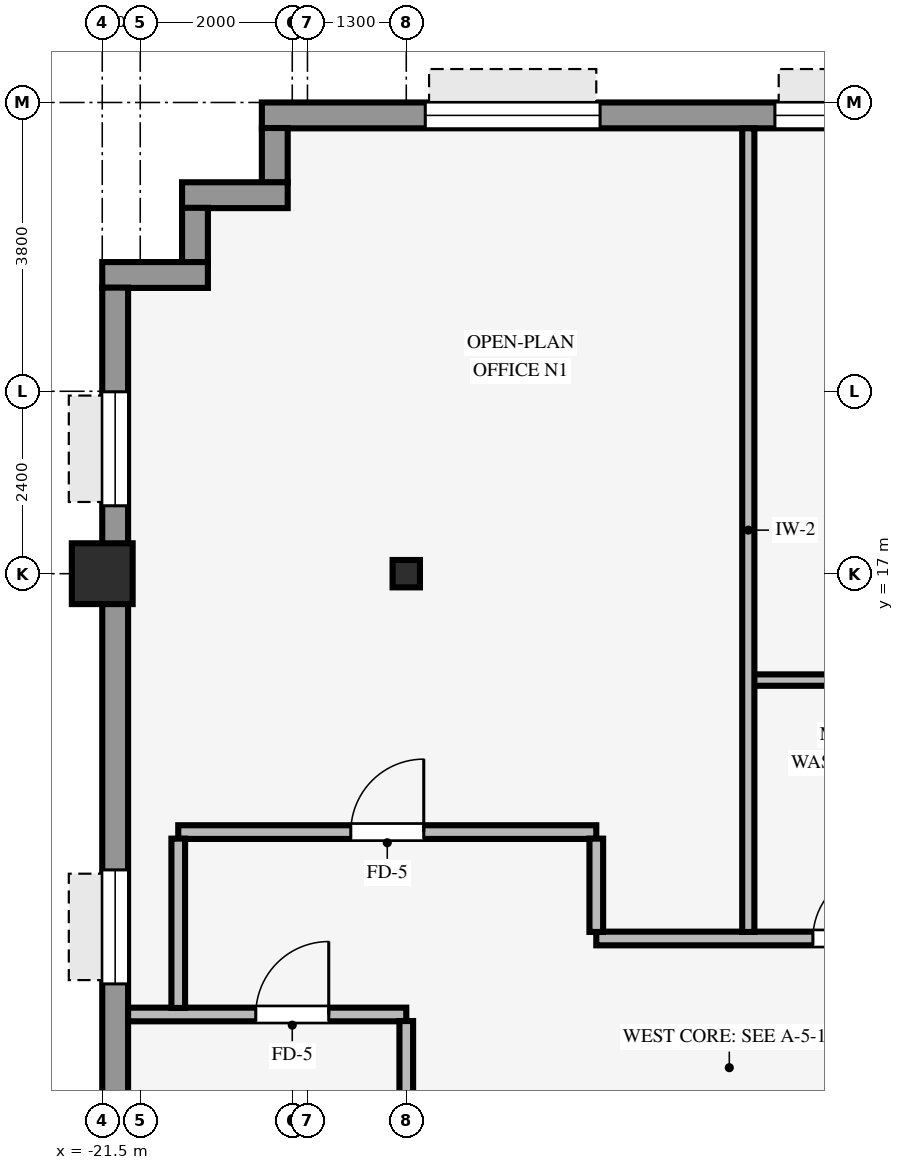
"""IFC4 building model, lengths in metres.
Left out: names, types, materials, properties, quantities, classifications, styles, units other than length and angle.
Written with IfcOpenShell. Run it as: python <this file> out.ifc"""

import sys

from ifc_helpers import new_model, si_unit, direction, frame, frame_2d, origin, origin_2d, place, context, subcontext, project, spatial, rectangle, hollow_rectangle, i_section, extrude, source, transform, mapped, element, fill, save


model = new_model("IFC4")
c1 = context("Model", 3, precision=1e-05, world=origin(), true_north=direction((0.0, 1.0)))
c2 = subcontext(c1, "Body", "Model", "MODEL_VIEW")
j1 = project(units=[si_unit("LENGTHUNIT", "METRE"), si_unit("PLANEANGLEUNIT", "RADIAN")], contexts=[c1])
p1 = place(None, origin())
s1 = spatial("IfcSite", under=j1, at=p1, CompositionType="ELEMENT")
p2 = place(p1, origin())
s2 = spatial("IfcBuilding", under=s1, at=p2, CompositionType="ELEMENT")
p3 = place(p2, frame((0.0, 0.0, 71.4)))
s3 = spatial("IfcBuildingStorey", under=s2, at=p3, CompositionType="ELEMENT", Elevation=71.4)
p4 = place(p3, frame((-21.5, 17.0, 0.0), z_axis=(0.0, 0.0, 1.0), x_axis=(1.0, 0.0, 0.0)))
e1 = element("IfcColumn", 1, at=p4, inside=s3, PredefinedType="COLUMN", context=c2, shape_type="SweptSolid", body=[
    extrude(hollow_rectangle(XDim=0.8, YDim=0.8, WallThickness=0.055, InnerFilletRadius=0.055, OuterFilletRadius=0.11, at=origin_2d()), origin(), (0.0, 0.0, 1.0), 3.37),
])
p5 = place(p3, frame((-17.5, 17.0, 0.0), z_axis=(0.0, 0.0, 1.0), x_axis=(1.0, 0.0, 0.0)))
e2 = element("IfcColumn", 2, at=p5, inside=s3, PredefinedType="COLUMN", context=c2, shape_type="SweptSolid", body=[
    extrude(i_section(OverallWidth=0.36, OverallDepth=0.36, WebThickness=0.021, FlangeThickness=0.021, FilletRadius=0.018, at=origin_2d()), origin(), (0.0, 0.0, 1.0), 3.37),
])
p6 = place(p3, frame((-19.4, 23.03, 0.0), z_axis=(0.0, 0.0, 1.0), x_axis=(1.0, 0.0, 0.0)))
e3 = element("IfcWall", 3, at=p6, inside=s3, PredefinedType="STANDARD", context=c2, shape_type="SweptSolid", body=[
    extrude(rectangle(XDim=38.8, YDim=0.34, at=frame_2d((19.4, 0.0))), origin(), (0.0, 0.0, 1.0), 2.705),
])
p7 = place(p6, frame((2.15, 0.0, 0.8)))
e4 = element("IfcOpeningElement", 4, at=p7, cuts=e3, PredefinedType="OPENING", context=c2, shape_type="SweptSolid", body=[
    extrude(rectangle(XDim=2.3, YDim=1.62, at=frame_2d((1.15, 0.81))), frame((0.0, 0.18, 0.0), z_axis=(0.0, -1.0, 0.0), x_axis=(1.0, 0.0, 0.0)), (0.0, 0.0, 1.0), 0.36),
])
p8 = place(p6, frame((6.75, 0.0, 0.8)))
e5 = element("IfcOpeningElement", 5, at=p8, cuts=e3, PredefinedType="OPENING", context=c2, shape_type="SweptSolid", body=[
    extrude(rectangle(XDim=2.3, YDim=1.62, at=frame_2d((1.15, 0.81))), frame((0.0, 0.18, 0.0), z_axis=(0.0, -1.0, 0.0), x_axis=(1.0, 0.0, 0.0)), (0.0, 0.0, 1.0), 0.36),
])
p9 = place(p6, frame((11.35, 0.0, 0.8)))
e6 = element("IfcOpeningElement", 6, at=p9, cuts=e3, PredefinedType="OPENING", context=c2, shape_type="SweptSolid", body=[
    extrude(rectangle(XDim=2.3, YDim=1.62, at=frame_2d((1.15, 0.81))), frame((0.0, 0.18, 0.0), z_axis=(0.0, -1.0, 0.0), x_axis=(1.0, 0.0, 0.0)), (0.0, 0.0, 1.0), 0.36),
])
p10 = place(p6, frame((15.95, 0.0, 0.8)))
e7 = element("IfcOpeningElement", 7, at=p10, cuts=e3, PredefinedType="OPENING", context=c2, shape_type="SweptSolid", body=[
    extrude(rectangle(XDim=2.3, YDim=1.62, at=frame_2d((1.15, 0.81))), frame((0.0, 0.18, 0.0), z_axis=(0.0, -1.0, 0.0), x_axis=(1.0, 0.0, 0.0)), (0.0, 0.0, 1.0), 0.36),
])
p11 = place(p6, frame((20.55, 0.0, 0.8)))
e8 = element("IfcOpeningElement", 8, at=p11, cuts=e3, PredefinedType="OPENING", context=c2, shape_type="SweptSolid", body=[
    extrude(rectangle(XDim=2.3, YDim=1.62, at=frame_2d((1.15, 0.81))), frame((0.0, 0.18, 0.0), z_axis=(0.0, -1.0, 0.0), x_axis=(1.0, 0.0, 0.0)), (0.0, 0.0, 1.0), 0.36),
])
p12 = place(p6, frame((25.15, 0.0, 0.8)))
e9 = element("IfcOpeningElement", 9, at=p12, cuts=e3, PredefinedType="OPENING", context=c2, shape_type="SweptSolid", body=[
    extrude(rectangle(XDim=2.3, YDim=1.62, at=frame_2d((1.15, 0.81))), frame((0.0, 0.18, 0.0), z_axis=(0.0, -1.0, 0.0), x_axis=(1.0, 0.0, 0.0)), (0.0, 0.0, 1.0), 0.36),
])
p13 = place(p6, frame((31.1, 0.0, 0.8)))
e10 = element("IfcOpeningElement", 10, at=p13, cuts=e3, PredefinedType="OPENING", context=c2, shape_type="SweptSolid", body=[
    extrude(rectangle(XDim=2.3, YDim=1.62, at=frame_2d((1.15, 0.81))), frame((0.0, 0.18, 0.0), z_axis=(0.0, -1.0, 0.0), x_axis=(1.0, 0.0, 0.0)), (0.0, 0.0, 1.0), 0.36),
])
p14 = place(p6, frame((34.35, 0.0, 0.8)))
e11 = element("IfcOpeningElement", 11, at=p14, cuts=e3, PredefinedType="OPENING", context=c2, shape_type="SweptSolid", body=[
    extrude(rectangle(XDim=2.3, YDim=1.62, at=frame_2d((1.15, 0.81))), frame((0.0, 0.18, 0.0), z_axis=(0.0, -1.0, 0.0), x_axis=(1.0, 0.0, 0.0)), (0.0, 0.0, 1.0), 0.36),
])
p15 = place(p3, frame((-19.23, 22.146, 0.0), z_axis=(0.0, 0.0, 1.0), x_axis=(0.0, 1.0, 0.0)))
e12 = element("IfcWall", 12, at=p15, inside=s3, PredefinedType="STANDARD", context=c2, shape_type="SweptSolid", body=[
    extrude(rectangle(XDim=0.718, YDim=0.34, at=frame_2d((0.359, 0.0))), origin(), (0.0, 0.0, 1.0), 3.36),
])
p16 = place(p3, frame((-20.45, 21.98, 0.0), z_axis=(0.0, 0.0, 1.0), x_axis=(1.0, 0.0, 0.0)))
e13 = element("IfcWall", 13, at=p16, inside=s3, PredefinedType="STANDARD", context=c2, shape_type="SweptSolid", body=[
    extrude(rectangle(XDim=1.39, YDim=0.34, at=frame_2d((0.695, 0.0))), origin(), (0.0, 0.0, 1.0), 3.36),
])
p17 = place(p3, frame((-20.28, 21.096, 0.0), z_axis=(0.0, 0.0, 1.0), x_axis=(0.0, 1.0, 0.0)))
e14 = element("IfcWall", 14, at=p17, inside=s3, PredefinedType="STANDARD", context=c2, shape_type="SweptSolid", body=[
    extrude(rectangle(XDim=0.718, YDim=0.34, at=frame_2d((0.359, 0.0))), origin(), (0.0, 0.0, 1.0), 3.36),
])
p18 = place(p3, frame((-21.5, 20.93, 0.0), z_axis=(0.0, 0.0, 1.0), x_axis=(1.0, 0.0, 0.0)))
e15 = element("IfcWall", 15, at=p18, inside=s3, PredefinedType="STANDARD", context=c2, shape_type="SweptSolid", body=[
    extrude(rectangle(XDim=1.39, YDim=0.34, at=frame_2d((0.695, 0.0))), origin(), (0.0, 0.0, 1.0), 3.36),
])
p19 = place(p3, frame((-21.33, -20.764, 0.0), z_axis=(0.0, 0.0, 1.0), x_axis=(0.0, 1.0, 0.0)))
e16 = element("IfcWall", 16, at=p19, inside=s3, PredefinedType="STANDARD", context=c2, shape_type="SweptSolid", body=[
    extrude(rectangle(XDim=41.528, YDim=0.34, at=frame_2d((20.764, 0.0))), origin(), (0.0, 0.0, 1.0), 2.705),
])
p20 = place(p19, frame((15.464, 0.0, 0.0)))
e17 = element("IfcOpeningElement", 17, at=p20, cuts=e16, PredefinedType="OPENING", context=c2, shape_type="SweptSolid", body=[
    extrude(rectangle(XDim=0.98, YDim=2.15, at=frame_2d((0.49, 1.075))), frame((0.0, 0.18, 0.0), z_axis=(0.0, -1.0, 0.0), x_axis=(1.0, 0.0, 0.0)), (0.0, 0.0, 1.0), 0.36),
])
p21 = place(p19, frame((1.371, 0.0, 0.8)))
e18 = element("IfcOpeningElement", 18, at=p21, cuts=e16, PredefinedType="OPENING", context=c2, shape_type="SweptSolid", body=[
    extrude(rectangle(XDim=1.5, YDim=1.6, at=frame_2d((0.75, 0.8))), frame((0.0, 0.18, 0.0), z_axis=(0.0, -1.0, 0.0), x_axis=(1.0, 0.0, 0.0)), (0.0, 0.0, 1.0), 0.36),
])
p22 = place(p19, frame((7.662, 0.0, 0.8)))
e19 = element("IfcOpeningElement", 19, at=p22, cuts=e16, PredefinedType="OPENING", context=c2, shape_type="SweptSolid", body=[
    extrude(rectangle(XDim=1.5, YDim=1.6, at=frame_2d((0.75, 0.8))), frame((0.0, 0.18, 0.0), z_axis=(0.0, -1.0, 0.0), x_axis=(1.0, 0.0, 0.0)), (0.0, 0.0, 1.0), 0.36),
])
p23 = place(p19, frame((12.603, 0.0, 0.8)))
e20 = element("IfcOpeningElement", 20, at=p23, cuts=e16, PredefinedType="OPENING", context=c2, shape_type="SweptSolid", body=[
    extrude(rectangle(XDim=1.5, YDim=1.6, at=frame_2d((0.75, 0.8))), frame((0.0, 0.18, 0.0), z_axis=(0.0, -1.0, 0.0), x_axis=(1.0, 0.0, 0.0)), (0.0, 0.0, 1.0), 0.36),
])
p24 = place(p19, frame((22.485, 0.0, 0.8)))
e21 = element("IfcOpeningElement", 21, at=p24, cuts=e16, PredefinedType="OPENING", context=c2, shape_type="SweptSolid", body=[
    extrude(rectangle(XDim=1.5, YDim=1.6, at=frame_2d((0.75, 0.8))), frame((0.0, 0.18, 0.0), z_axis=(0.0, -1.0, 0.0), x_axis=(1.0, 0.0, 0.0)), (0.0, 0.0, 1.0), 0.36),
])
p25 = place(p19, frame((27.426, 0.0, 0.8)))
e22 = element("IfcOpeningElement", 22, at=p25, cuts=e16, PredefinedType="OPENING", context=c2, shape_type="SweptSolid", body=[
    extrude(rectangle(XDim=1.5, YDim=1.6, at=frame_2d((0.75, 0.8))), frame((0.0, 0.18, 0.0), z_axis=(0.0, -1.0, 0.0), x_axis=(1.0, 0.0, 0.0)), (0.0, 0.0, 1.0), 0.36),
])
p26 = place(p19, frame((32.366, 0.0, 0.8)))
e23 = element("IfcOpeningElement", 23, at=p26, cuts=e16, PredefinedType="OPENING", context=c2, shape_type="SweptSolid", body=[
    extrude(rectangle(XDim=1.5, YDim=1.6, at=frame_2d((0.75, 0.8))), frame((0.0, 0.18, 0.0), z_axis=(0.0, -1.0, 0.0), x_axis=(1.0, 0.0, 0.0)), (0.0, 0.0, 1.0), 0.36),
])
p27 = place(p19, frame((38.657, 0.0, 0.8)))
e24 = element("IfcOpeningElement", 24, at=p27, cuts=e16, PredefinedType="OPENING", context=c2, shape_type="SweptSolid", body=[
    extrude(rectangle(XDim=1.5, YDim=1.6, at=frame_2d((0.75, 0.8))), frame((0.0, 0.18, 0.0), z_axis=(0.0, -1.0, 0.0), x_axis=(1.0, 0.0, 0.0)), (0.0, 0.0, 1.0), 0.36),
])
p28 = place(p3, frame((-21.16, 11.2, 0.0), z_axis=(0.0, 0.0, 1.0), x_axis=(1.0, 0.0, 0.0)))
e25 = element("IfcWall", 25, at=p28, inside=s3, PredefinedType="PARTITIONING", context=c2, shape_type="SweptSolid", body=[
    extrude(rectangle(XDim=3.66, YDim=0.18, at=frame_2d((1.83, 0.0))), origin(), (0.0, 0.0, 1.0), 3.36),
])
p29 = place(p28, frame((1.68, 0.0, 0.0)))
e26 = element("IfcOpeningElement", 26, at=p29, cuts=e25, PredefinedType="OPENING", context=c2, shape_type="SweptSolid", body=[
    extrude(rectangle(XDim=0.96, YDim=2.1, at=frame_2d((0.48, 1.05))), frame((0.0, 0.1, 0.0), z_axis=(0.0, -1.0, 0.0), x_axis=(1.0, 0.0, 0.0)), (0.0, 0.0, 1.0), 0.2),
])
p30 = place(p3, frame((-15.0, 12.2, 0.0), z_axis=(0.0, 0.0, 1.0), x_axis=(1.0, 0.0, 0.0)))
e27 = element("IfcWall", 27, at=p30, inside=s3, PredefinedType="PARTITIONING", context=c2, shape_type="SweptSolid", body=[
    extrude(rectangle(XDim=30.0, YDim=0.18, at=frame_2d((15.0, 0.0))), origin(), (0.0, 0.0, 1.0), 3.36),
])
p31 = place(p30, frame((22.085, 0.0, 0.0)))
e28 = element("IfcOpeningElement", 28, at=p31, cuts=e27, PredefinedType="OPENING", context=c2, shape_type="SweptSolid", body=[
    extrude(rectangle(XDim=0.96, YDim=2.1, at=frame_2d((0.48, 1.05))), frame((0.0, 0.1, 0.0), z_axis=(0.0, -1.0, 0.0), x_axis=(1.0, 0.0, 0.0)), (0.0, 0.0, 1.0), 0.2),
])
p32 = place(p30, frame((16.175, 0.0, 0.0)))
e29 = element("IfcOpeningElement", 29, at=p32, cuts=e27, PredefinedType="OPENING", context=c2, shape_type="SweptSolid", body=[
    extrude(rectangle(XDim=0.96, YDim=2.1, at=frame_2d((0.48, 1.05))), frame((0.0, 0.1, 0.0), z_axis=(0.0, -1.0, 0.0), x_axis=(1.0, 0.0, 0.0)), (0.0, 0.0, 1.0), 0.2),
])
p33 = place(p30, frame((5.45, 0.0, 0.0)))
e30 = element("IfcOpeningElement", 30, at=p33, cuts=e27, PredefinedType="OPENING", context=c2, shape_type="SweptSolid", body=[
    extrude(rectangle(XDim=0.9, YDim=2.1, at=frame_2d((0.45, 1.05))), frame((0.0, 0.1, 0.0), z_axis=(0.0, -1.0, 0.0), x_axis=(1.0, 0.0, 0.0)), (0.0, 0.0, 1.0), 0.2),
])
p34 = place(p30, frame((2.85, 0.0, 0.0)))
e31 = element("IfcOpeningElement", 31, at=p34, cuts=e27, PredefinedType="OPENING", context=c2, shape_type="SweptSolid", body=[
    extrude(rectangle(XDim=0.9, YDim=2.1, at=frame_2d((0.45, 1.05))), frame((0.0, 0.1, 0.0), z_axis=(0.0, -1.0, 0.0), x_axis=(1.0, 0.0, 0.0)), (0.0, 0.0, 1.0), 0.2),
])
p35 = place(p30, frame((12.52, 0.0, 0.0)))
e32 = element("IfcOpeningElement", 32, at=p35, cuts=e27, PredefinedType="OPENING", context=c2, shape_type="SweptSolid", body=[
    extrude(rectangle(XDim=0.96, YDim=2.1, at=frame_2d((0.48, 1.05))), frame((0.0, 0.1, 0.0), z_axis=(0.0, -1.0, 0.0), x_axis=(1.0, 0.0, 0.0)), (0.0, 0.0, 1.0), 0.2),
])
p36 = place(p30, frame((7.95, 0.0, 0.0)))
e33 = element("IfcOpeningElement", 33, at=p36, cuts=e27, PredefinedType="OPENING", context=c2, shape_type="SweptSolid", body=[
    extrude(rectangle(XDim=0.9, YDim=2.1, at=frame_2d((0.45, 1.05))), frame((0.0, 0.1, 0.0), z_axis=(0.0, -1.0, 0.0), x_axis=(1.0, 0.0, 0.0)), (0.0, 0.0, 1.0), 0.2),
])
p37 = place(p3, frame((-20.5, 13.6, 0.0), z_axis=(0.0, 0.0, 1.0), x_axis=(1.0, 0.0, 0.0)))
e34 = element("IfcWall", 34, at=p37, inside=s3, PredefinedType="PARTITIONING", context=c2, shape_type="SweptSolid", body=[
    extrude(rectangle(XDim=5.5, YDim=0.18, at=frame_2d((2.75, 0.0))), origin(), (0.0, 0.0, 1.0), 2.942),
])
p38 = place(p37, frame((2.27, 0.0, 0.0)))
e35 = element("IfcOpeningElement", 35, at=p38, cuts=e34, PredefinedType="OPENING", context=c2, shape_type="SweptSolid", body=[
    extrude(rectangle(XDim=0.96, YDim=2.1, at=frame_2d((0.48, 1.05))), frame((0.0, 0.1, 0.0), z_axis=(0.0, -1.0, 0.0), x_axis=(1.0, 0.0, 0.0)), (0.0, 0.0, 1.0), 0.2),
])
p39 = place(p3, frame((-12.929, 15.6, 0.0), z_axis=(0.0, 0.0, 1.0), x_axis=(1.0, 0.0, 0.0)))
e36 = element("IfcWall", 36, at=p39, inside=s3, PredefinedType="PARTITIONING", context=c2, shape_type="SweptSolid", body=[
    extrude(rectangle(XDim=7.529, YDim=0.15, at=frame_2d((3.765, 0.0))), origin(), (0.0, 0.0, 1.0), 3.36),
])
p40 = place(p3, frame((-20.5, 11.286, 0.0), z_axis=(0.0, 0.0, 1.0), x_axis=(0.0, 1.0, 0.0)))
e37 = element("IfcWall", 37, at=p40, inside=s3, PredefinedType="PARTITIONING", context=c2, shape_type="SweptSolid", body=[
    extrude(rectangle(XDim=2.228, YDim=0.18, at=frame_2d((1.114, 0.0))), origin(), (0.0, 0.0, 1.0), 3.36),
])
p41 = place(p3, frame((-17.5, 10.146, 0.0), z_axis=(0.0, 0.0, 1.0), x_axis=(0.0, 1.0, 0.0)))
e38 = element("IfcWall", 38, at=p41, inside=s3, PredefinedType="PARTITIONING", context=c2, shape_type="SweptSolid", body=[
    extrude(rectangle(XDim=0.968, YDim=0.18, at=frame_2d((0.484, 0.0))), origin(), (0.0, 0.0, 1.0), 2.738),
])
p42 = place(p3, frame((-15.0, 12.286, 0.0), z_axis=(0.0, 0.0, 1.0), x_axis=(0.0, 1.0, 0.0)))
e39 = element("IfcWall", 39, at=p42, inside=s3, PredefinedType="PARTITIONING", context=c2, shape_type="SweptSolid", body=[
    extrude(rectangle(XDim=1.228, YDim=0.18, at=frame_2d((0.614, 0.0))), origin(), (0.0, 0.0, 1.0), 3.36),
])
p43 = place(p3, frame((-13.0, 12.286, 0.0), z_axis=(0.0, 0.0, 1.0), x_axis=(0.0, 1.0, 0.0)))
e40 = element("IfcWall", 40, at=p43, inside=s3, PredefinedType="PARTITIONING", context=c2, shape_type="SweptSolid", body=[
    extrude(rectangle(XDim=10.574, YDim=0.16, at=frame_2d((5.287, 0.0))), origin(), (0.0, 0.0, 1.0), 3.36),
])
m1 = source(origin(), c2, "Body", "SweptSolid", [
    extrude(rectangle(XDim=2.3, YDim=1.62, at=frame_2d((1.15, 0.81))), frame((0.0, 0.03, 0.0), z_axis=(0.0, -1.0, 0.0), x_axis=(1.0, 0.0, 0.0)), (0.0, 0.0, 1.0), 0.06),
])
p44 = place(p7, origin())
e41 = element("IfcWindow", 41, at=p44, inside=s3, PartitioningType="SINGLE_PANEL", PredefinedType="WINDOW", context=c2, shape_type="MappedRepresentation", body=[
    mapped(m1, transform((0.0, 0.0, 0.0), scale=1.0)),
])
fill(e4, e41)
p45 = place(p8, origin())
e42 = element("IfcWindow", 42, at=p45, inside=s3, PartitioningType="SINGLE_PANEL", PredefinedType="WINDOW", context=c2, shape_type="MappedRepresentation", body=[
    mapped(m1, transform((0.0, 0.0, 0.0), scale=1.0)),
])
fill(e5, e42)
m2 = source(origin(), c2, "Body", "SweptSolid", [
    extrude(rectangle(XDim=1.5, YDim=1.6, at=frame_2d((0.75, 0.8))), frame((0.0, 0.03, 0.0), z_axis=(0.0, -1.0, 0.0), x_axis=(1.0, 0.0, 0.0)), (0.0, 0.0, 1.0), 0.06),
])
p46 = place(p26, origin())
e43 = element("IfcWindow", 43, at=p46, inside=s3, PartitioningType="SINGLE_PANEL", PredefinedType="WINDOW", context=c2, shape_type="MappedRepresentation", body=[
    mapped(m2, transform((0.0, 0.0, 0.0), scale=1.0)),
])
fill(e23, e43)
p47 = place(p27, origin())
e44 = element("IfcWindow", 44, at=p47, inside=s3, PartitioningType="SINGLE_PANEL", PredefinedType="WINDOW", context=c2, shape_type="MappedRepresentation", body=[
    mapped(m2, transform((0.0, 0.0, 0.0), scale=1.0)),
])
fill(e24, e44)
m3 = source(origin(), c2, "Body", "SweptSolid", [
    extrude(rectangle(XDim=0.96, YDim=2.1, at=frame_2d((0.48, 1.05))), frame((0.0, 0.025, 0.0), z_axis=(0.0, -1.0, 0.0), x_axis=(1.0, 0.0, 0.0)), (0.0, 0.0, 1.0), 0.05),
])
p48 = place(p38, origin())
e45 = element("IfcDoor", 45, at=p48, inside=s3, OperationType="SINGLE_SWING_RIGHT", PredefinedType="DOOR", context=c2, shape_type="MappedRepresentation", body=[
    mapped(m3, transform((0.0, 0.0, 0.0), scale=1.0)),
])
fill(e35, e45)
p49 = place(p29, origin())
e46 = element("IfcDoor", 46, at=p49, inside=s3, OperationType="SINGLE_SWING_RIGHT", PredefinedType="DOOR", context=c2, shape_type="MappedRepresentation", body=[
    mapped(m3, transform((0.0, 0.0, 0.0), scale=1.0)),
])
fill(e26, e46)
m4 = source(origin(), c2, "Body", "SweptSolid", [
    extrude(rectangle(XDim=0.9, YDim=2.1, at=frame_2d((0.45, 1.05))), frame((0.0, 0.025, 0.0), z_axis=(0.0, -1.0, 0.0), x_axis=(1.0, 0.0, 0.0)), (0.0, 0.0, 1.0), 0.05),
])
p50 = place(p34, origin())
e47 = element("IfcDoor", 47, at=p50, inside=s3, OperationType="SINGLE_SWING_RIGHT", PredefinedType="DOOR", context=c2, shape_type="MappedRepresentation", body=[
    mapped(m4, transform((0.0, 0.0, 0.0), scale=1.0)),
])
fill(e31, e47)
save(model, sys.argv[1])
